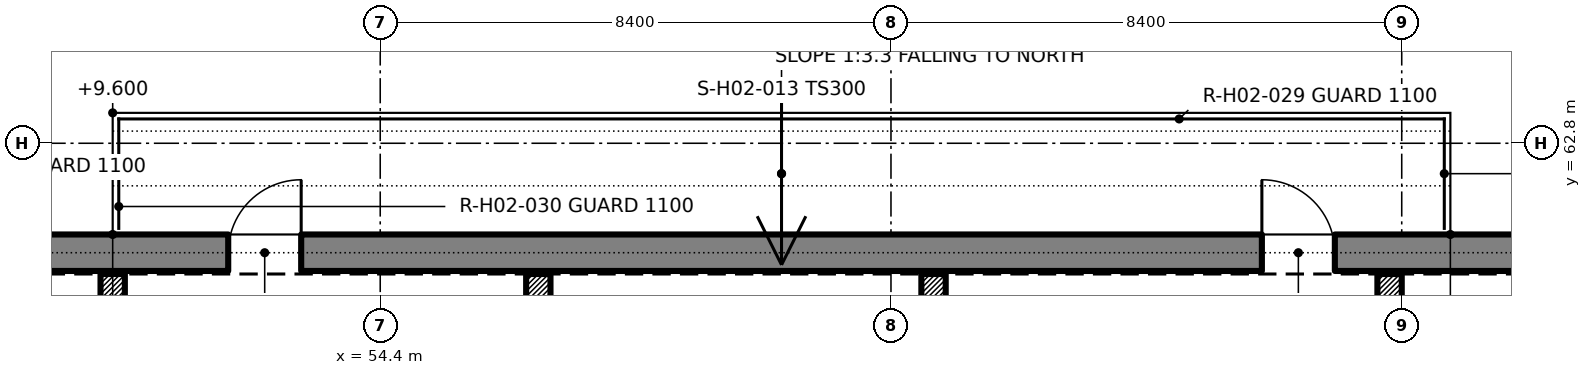
"""IFC4 building model, lengths in metres.
Left out: names, types, materials, properties, quantities, classifications, styles, units other than length and angle.
Written with IfcOpenShell. Run it as: python <this file> out.ifc"""

import sys

from ifc_helpers import new_model, si_unit, direction, frame, frame_2d, origin, origin_2d, place, context, subcontext, project, spatial, rectangle, extrude, element, fill, save


model = new_model("IFC4")
c1 = context("Model", 3, precision=1e-05, world=origin(), true_north=direction((0.0, 1.0)))
c2 = subcontext(c1, "Body", "Model", "MODEL_VIEW")
j1 = project(units=[si_unit("LENGTHUNIT", "METRE"), si_unit("PLANEANGLEUNIT", "RADIAN")], contexts=[c1])
p1 = place(None, origin())
s1 = spatial("IfcSite", under=j1, at=p1, CompositionType="ELEMENT")
p2 = place(p1, origin())
s2 = spatial("IfcBuilding", under=s1, at=p2, CompositionType="ELEMENT")
p3 = place(p2, frame((0.0, 0.0, 10.2)))
s3 = spatial("IfcBuildingStorey", under=s2, at=p3, CompositionType="ELEMENT", Elevation=10.2)
p4 = place(p3, frame((36.5, 61.0, 0.0), z_axis=(0.0, 0.0, 1.0), x_axis=(1.0, 0.0, 0.0)))
e1 = element("IfcWall", 1, at=p4, inside=s3, PredefinedType="SOLIDWALL", context=c2, shape_type="SweptSolid", body=[
    extrude(rectangle(XDim=52.6, YDim=0.6, at=frame_2d((26.3, 0.0))), origin(), (0.0, 0.0, 1.0), 4.8),
])
p5 = place(p4, frame((7.9, 0.0, 0.0)))
e2 = element("IfcOpeningElement", 2, at=p5, cuts=e1, PredefinedType="OPENING", context=c2, shape_type="SweptSolid", body=[
    extrude(rectangle(XDim=1.2, YDim=2.1, at=frame_2d((0.6, 1.05))), frame((0.0, 0.31, 0.0), z_axis=(0.0, -1.0, 0.0), x_axis=(1.0, 0.0, 0.0)), (0.0, 0.0, 1.0), 0.62),
])
p6 = place(p4, frame((15.4, 0.0, 0.0)))
e3 = element("IfcOpeningElement", 3, at=p6, cuts=e1, PredefinedType="OPENING", context=c2, shape_type="SweptSolid", body=[
    extrude(rectangle(XDim=1.2, YDim=2.1, at=frame_2d((0.6, 1.05))), frame((0.0, 0.31, 0.0), z_axis=(0.0, -1.0, 0.0), x_axis=(1.0, 0.0, 0.0)), (0.0, 0.0, 1.0), 0.62),
])
p7 = place(p4, frame((32.4, 0.0, 0.0)))
e4 = element("IfcOpeningElement", 4, at=p7, cuts=e1, PredefinedType="OPENING", context=c2, shape_type="SweptSolid", body=[
    extrude(rectangle(XDim=1.2, YDim=2.1, at=frame_2d((0.6, 1.05))), frame((0.0, 0.31, 0.0), z_axis=(0.0, -1.0, 0.0), x_axis=(1.0, 0.0, 0.0)), (0.0, 0.0, 1.0), 0.62),
])
for number, where, z_axis, x_axis in (
    (5, (50.0, 60.45, 0.0), (0.0, 0.0, 1.0), (1.0, 0.0, 0.0)),
    (6, (57.0, 60.45, 0.0), (0.0, 0.0, 1.0), (1.0, 0.0, 0.0)),
    (7, (63.5, 60.45, 0.0), (0.0, 0.0, 1.0), (1.0, 0.0, 0.0)),
    (8, (71.0, 60.45, 0.0), (0.0, 0.0, 1.0), (1.0, 0.0, 0.0)),
):
    element("IfcColumn", number, at=place(p3, frame(where, z_axis=z_axis, x_axis=x_axis)), inside=s3, PredefinedType="COLUMN", context=c2, shape_type="SweptSolid", body=[
        extrude(rectangle(XDim=0.4, YDim=0.4, at=origin_2d()), origin(), (0.0, 0.0, 1.0), 4.8),
    ])
p8 = place(p6, origin())
e9 = element("IfcDoor", 9, at=p8, inside=s3, OperationType="SINGLE_SWING_RIGHT", PredefinedType="DOOR", context=c2, shape_type="SweptSolid", body=[
    extrude(rectangle(XDim=1.2, YDim=2.1, at=frame_2d((0.6, 1.05))), frame((0.0, 0.025, 0.0), z_axis=(0.0, -1.0, 0.0), x_axis=(1.0, 0.0, 0.0)), (0.0, 0.0, 1.0), 0.05),
])
fill(e3, e9)
p9 = place(p7, origin())
e10 = element("IfcDoor", 10, at=p9, inside=s3, OperationType="SINGLE_SWING_LEFT", PredefinedType="DOOR", context=c2, shape_type="SweptSolid", body=[
    extrude(rectangle(XDim=1.2, YDim=2.1, at=frame_2d((0.6, 1.05))), frame((0.0, 0.025, 0.0), z_axis=(0.0, -1.0, 0.0), x_axis=(1.0, 0.0, 0.0)), (0.0, 0.0, 1.0), 0.05),
])
fill(e4, e10)
save(model, sys.argv[1])
